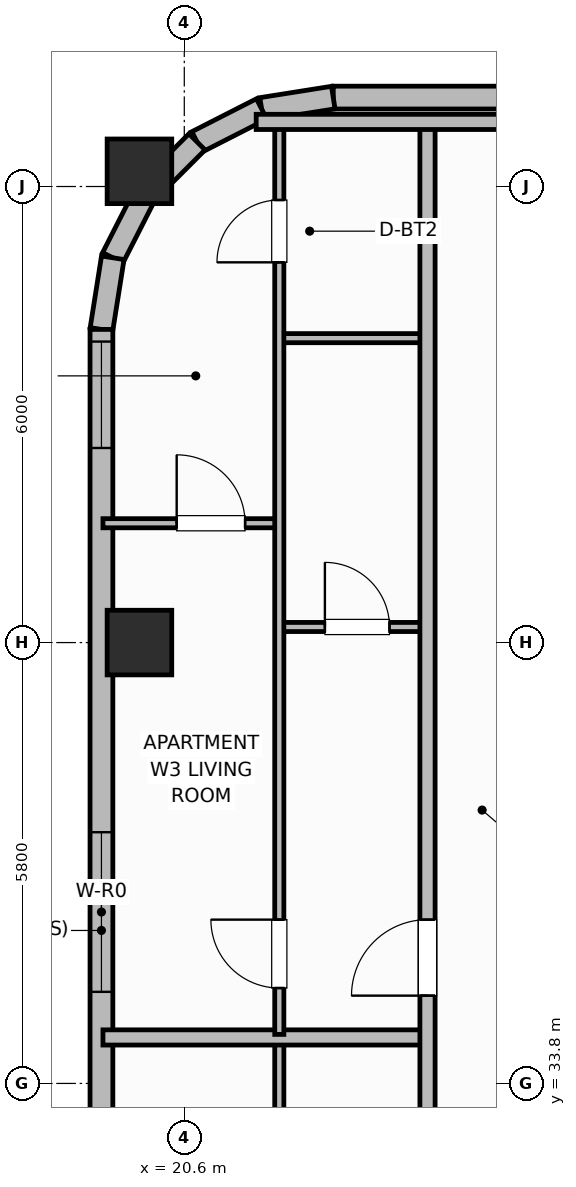
"""IFC4 building model, lengths in metres.
Left out: names, types, materials, properties, quantities, classifications, styles, units other than length and angle.
Written with IfcOpenShell. Run it as: python <this file> out.ifc"""

import sys

from ifc_helpers import new_model, si_unit, direction, frame, frame_2d, origin, origin_2d, place, context, subcontext, project, spatial, rectangle, extrude, element, fill, save


model = new_model("IFC4")
c1 = context("Model", 3, precision=1e-05, world=origin(), true_north=direction((0.0, 1.0)))
c2 = subcontext(c1, "Body", "Model", "MODEL_VIEW")
j1 = project(units=[si_unit("LENGTHUNIT", "METRE"), si_unit("PLANEANGLEUNIT", "RADIAN")], contexts=[c1])
p1 = place(None, origin())
s1 = spatial("IfcSite", under=j1, at=p1, CompositionType="ELEMENT")
p2 = place(p1, origin())
s2 = spatial("IfcBuilding", under=s1, at=p2, CompositionType="ELEMENT")
p3 = place(p2, frame((0.0, 0.0, 240.6)))
s3 = spatial("IfcBuildingStorey", under=s2, at=p3, CompositionType="ELEMENT", Elevation=240.6)
for number, where, z_axis, x_axis in (
    (1, (20.01, 39.6, 0.0), (0.0, 0.0, 1.0), (1.0, 0.0, 0.0)),
    (2, (20.01, 45.8, 0.0), (0.0, 0.0, 1.0), (1.0, 0.0, 0.0)),
):
    element("IfcColumn", number, at=place(p3, frame(where, z_axis=z_axis, x_axis=x_axis)), inside=s3, PredefinedType="COLUMN", context=c2, shape_type="SweptSolid", body=[
        extrude(rectangle(XDim=0.85, YDim=0.85, at=origin_2d()), origin(), (0.0, 0.0, 1.0), 3.7),
    ])
p4 = place(p3, frame((55.84, 46.77, 0.0), z_axis=(0.0, 0.0, 1.0), x_axis=(-1.0, 0.0, 0.0)))
e3 = element("IfcWall", 3, at=p4, inside=s3, PredefinedType="SOLIDWALL", context=c2, shape_type="SweptSolid", body=[
    extrude(rectangle(XDim=33.28, YDim=0.3, at=frame_2d((16.64, 0.0))), origin(), (0.0, 0.0, 1.0), 2.73),
])
p5 = place(p4, frame((4.461, 0.0, 0.95)))
e4 = element("IfcOpeningElement", 4, at=p5, cuts=e3, PredefinedType="OPENING", context=c2, shape_type="SweptSolid", body=[
    extrude(rectangle(XDim=1.1, YDim=1.65, at=frame_2d((0.55, 0.825))), frame((0.0, 0.16, 0.0), z_axis=(0.0, -1.0, 0.0), x_axis=(1.0, 0.0, 0.0)), (0.0, 0.0, 1.0), 0.32),
])
p6 = place(p4, frame((7.368, 0.0, 0.95)))
e5 = element("IfcOpeningElement", 5, at=p6, cuts=e3, PredefinedType="OPENING", context=c2, shape_type="SweptSolid", body=[
    extrude(rectangle(XDim=1.1, YDim=1.65, at=frame_2d((0.55, 0.825))), frame((0.0, 0.16, 0.0), z_axis=(0.0, -1.0, 0.0), x_axis=(1.0, 0.0, 0.0)), (0.0, 0.0, 1.0), 0.32),
])
p7 = place(p4, frame((10.275, 0.0, 0.95)))
e6 = element("IfcOpeningElement", 6, at=p7, cuts=e3, PredefinedType="OPENING", context=c2, shape_type="SweptSolid", body=[
    extrude(rectangle(XDim=1.1, YDim=1.65, at=frame_2d((0.55, 0.825))), frame((0.0, 0.16, 0.0), z_axis=(0.0, -1.0, 0.0), x_axis=(1.0, 0.0, 0.0)), (0.0, 0.0, 1.0), 0.32),
])
p8 = place(p4, frame((13.883, 0.0, 0.95)))
e7 = element("IfcOpeningElement", 7, at=p8, cuts=e3, PredefinedType="OPENING", context=c2, shape_type="SweptSolid", body=[
    extrude(rectangle(XDim=1.1, YDim=1.65, at=frame_2d((0.55, 0.825))), frame((0.0, 0.16, 0.0), z_axis=(0.0, -1.0, 0.0), x_axis=(1.0, 0.0, 0.0)), (0.0, 0.0, 1.0), 0.32),
])
p9 = place(p4, frame((16.09, 0.0, 0.95)))
e8 = element("IfcOpeningElement", 8, at=p9, cuts=e3, PredefinedType="OPENING", context=c2, shape_type="SweptSolid", body=[
    extrude(rectangle(XDim=1.1, YDim=1.65, at=frame_2d((0.55, 0.825))), frame((0.0, 0.16, 0.0), z_axis=(0.0, -1.0, 0.0), x_axis=(1.0, 0.0, 0.0)), (0.0, 0.0, 1.0), 0.32),
])
p10 = place(p4, frame((18.297, 0.0, 0.95)))
e9 = element("IfcOpeningElement", 9, at=p10, cuts=e3, PredefinedType="OPENING", context=c2, shape_type="SweptSolid", body=[
    extrude(rectangle(XDim=1.1, YDim=1.65, at=frame_2d((0.55, 0.825))), frame((0.0, 0.16, 0.0), z_axis=(0.0, -1.0, 0.0), x_axis=(1.0, 0.0, 0.0)), (0.0, 0.0, 1.0), 0.32),
])
p11 = place(p4, frame((21.905, 0.0, 0.95)))
e10 = element("IfcOpeningElement", 10, at=p11, cuts=e3, PredefinedType="OPENING", context=c2, shape_type="SweptSolid", body=[
    extrude(rectangle(XDim=1.1, YDim=1.65, at=frame_2d((0.55, 0.825))), frame((0.0, 0.16, 0.0), z_axis=(0.0, -1.0, 0.0), x_axis=(1.0, 0.0, 0.0)), (0.0, 0.0, 1.0), 0.32),
])
p12 = place(p4, frame((24.812, 0.0, 0.95)))
e11 = element("IfcOpeningElement", 11, at=p12, cuts=e3, PredefinedType="OPENING", context=c2, shape_type="SweptSolid", body=[
    extrude(rectangle(XDim=1.1, YDim=1.65, at=frame_2d((0.55, 0.825))), frame((0.0, 0.16, 0.0), z_axis=(0.0, -1.0, 0.0), x_axis=(1.0, 0.0, 0.0)), (0.0, 0.0, 1.0), 0.32),
])
p13 = place(p4, frame((27.719, 0.0, 0.95)))
e12 = element("IfcOpeningElement", 12, at=p13, cuts=e3, PredefinedType="OPENING", context=c2, shape_type="SweptSolid", body=[
    extrude(rectangle(XDim=1.1, YDim=1.65, at=frame_2d((0.55, 0.825))), frame((0.0, 0.16, 0.0), z_axis=(0.0, -1.0, 0.0), x_axis=(1.0, 0.0, 0.0)), (0.0, 0.0, 1.0), 0.32),
])
p14 = place(p3, frame((22.56, 46.77, 0.0), z_axis=(0.0, 0.0, 1.0), x_axis=(-0.987669453596, -0.156553666304, 0.0)))
e13 = element("IfcWall", 13, at=p14, inside=s3, PredefinedType="SOLIDWALL", context=c2, shape_type="SweptSolid", body=[
    extrude(rectangle(XDim=0.954, YDim=0.3, at=frame_2d((0.477, 0.0))), origin(), (0.0, 0.0, 1.0), 2.73),
])
p15 = place(p3, frame((21.617, 46.621, 0.0), z_axis=(0.0, 0.0, 1.0), x_axis=(-0.891023873617, -0.45395644796, 0.0)))
e14 = element("IfcWall", 14, at=p15, inside=s3, PredefinedType="SOLIDWALL", context=c2, shape_type="SweptSolid", body=[
    extrude(rectangle(XDim=0.954, YDim=0.3, at=frame_2d((0.477, 0.0))), origin(), (0.0, 0.0, 1.0), 2.73),
])
p16 = place(p3, frame((20.767, 46.188, 0.0), z_axis=(0.0, 0.0, 1.0), x_axis=(-0.707106781187, -0.707106781187, 0.0)))
e15 = element("IfcWall", 15, at=p16, inside=s3, PredefinedType="SOLIDWALL", context=c2, shape_type="SweptSolid", body=[
    extrude(rectangle(XDim=0.954, YDim=0.3, at=frame_2d((0.477, 0.0))), origin(), (0.0, 0.0, 1.0), 2.73),
])
p17 = place(p3, frame((20.093, 45.513, 0.0), z_axis=(0.0, 0.0, 1.0), x_axis=(-0.454159573051, -0.890920356825, 0.0)))
e16 = element("IfcWall", 16, at=p17, inside=s3, PredefinedType="SOLIDWALL", context=c2, shape_type="SweptSolid", body=[
    extrude(rectangle(XDim=0.954, YDim=0.3, at=frame_2d((0.477, 0.0))), origin(), (0.0, 0.0, 1.0), 2.73),
])
p18 = place(p3, frame((19.659, 44.663, 0.0), z_axis=(0.0, 0.0, 1.0), x_axis=(-0.156304114255, -0.987708977314, 0.0)))
e17 = element("IfcWall", 17, at=p18, inside=s3, PredefinedType="SOLIDWALL", context=c2, shape_type="SweptSolid", body=[
    extrude(rectangle(XDim=0.954, YDim=0.3, at=frame_2d((0.477, 0.0))), origin(), (0.0, 0.0, 1.0), 2.73),
])
p19 = place(p3, frame((19.51, 43.72, 0.0), z_axis=(0.0, 0.0, 1.0), x_axis=(0.0, -1.0, 0.0)))
e18 = element("IfcWall", 18, at=p19, inside=s3, PredefinedType="SOLIDWALL", context=c2, shape_type="SweptSolid", body=[
    extrude(rectangle(XDim=11.12, YDim=0.3, at=frame_2d((5.56, 0.0))), origin(), (0.0, 0.0, 1.0), 2.73),
])
p20 = place(p19, frame((0.16, 0.0, 0.72)))
e19 = element("IfcOpeningElement", 19, at=p20, cuts=e18, PredefinedType="OPENING", context=c2, shape_type="SweptSolid", body=[
    extrude(rectangle(XDim=1.4, YDim=1.85, at=frame_2d((0.7, 0.925))), frame((0.0, 0.16, 0.0), z_axis=(0.0, -1.0, 0.0), x_axis=(1.0, 0.0, 0.0)), (0.0, 0.0, 1.0), 0.32),
])
p21 = place(p19, frame((6.615, 0.0, 0.71)))
e20 = element("IfcOpeningElement", 20, at=p21, cuts=e18, PredefinedType="OPENING", context=c2, shape_type="SweptSolid", body=[
    extrude(rectangle(XDim=2.1, YDim=1.9, at=frame_2d((1.05, 0.95))), frame((0.0, 0.16, 0.0), z_axis=(0.0, -1.0, 0.0), x_axis=(1.0, 0.0, 0.0)), (0.0, 0.0, 1.0), 0.32),
])
p22 = place(p3, frame((21.85, 22.74, 0.0), z_axis=(0.0, 0.0, 1.0), x_axis=(0.0, 1.0, 0.0)))
e21 = element("IfcWall", 21, at=p22, inside=s3, PredefinedType="PARTITIONING", context=c2, shape_type="SweptSolid", body=[
    extrude(rectangle(XDim=11.625, YDim=0.12, at=frame_2d((5.812, 0.0))), origin(), (0.0, 0.0, 1.0), 2.56),
])
p23 = place(p22, frame((0.61, 0.0, 0.0)))
e22 = element("IfcOpeningElement", 22, at=p23, cuts=e21, PredefinedType="OPENING", context=c2, shape_type="SweptSolid", body=[
    extrude(rectangle(XDim=0.9, YDim=2.1, at=frame_2d((0.45, 1.05))), frame((0.0, 0.07, 0.0), z_axis=(0.0, -1.0, 0.0), x_axis=(1.0, 0.0, 0.0)), (0.0, 0.0, 1.0), 0.14),
])
p24 = place(p3, frame((19.53, 34.405, 0.0), z_axis=(0.0, 0.0, 1.0), x_axis=(1.0, 0.0, 0.0)))
e23 = element("IfcWall", 23, at=p24, inside=s3, PredefinedType="PARTITIONING", context=c2, shape_type="SweptSolid", body=[
    extrude(rectangle(XDim=4.27, YDim=0.2, at=frame_2d((2.135, 0.0))), origin(), (0.0, 0.0, 1.0), 2.56),
])
p25 = place(p3, frame((21.85, 39.805, 0.0), z_axis=(0.0, 0.0, 1.0), x_axis=(1.0, 0.0, 0.0)))
e24 = element("IfcWall", 24, at=p25, inside=s3, PredefinedType="PARTITIONING", context=c2, shape_type="SweptSolid", body=[
    extrude(rectangle(XDim=1.95, YDim=0.12, at=frame_2d((0.975, 0.0))), origin(), (0.0, 0.0, 1.0), 2.56),
])
p26 = place(p25, frame((0.6, 0.0, 0.0)))
e25 = element("IfcOpeningElement", 25, at=p26, cuts=e24, PredefinedType="OPENING", context=c2, shape_type="SweptSolid", body=[
    extrude(rectangle(XDim=0.85, YDim=2.1, at=frame_2d((0.425, 1.05))), frame((0.0, 0.07, 0.0), z_axis=(0.0, -1.0, 0.0), x_axis=(1.0, 0.0, 0.0)), (0.0, 0.0, 1.0), 0.14),
])
p27 = place(p3, frame((21.85, 43.605, 0.0), z_axis=(0.0, 0.0, 1.0), x_axis=(1.0, 0.0, 0.0)))
e26 = element("IfcWall", 26, at=p27, inside=s3, PredefinedType="PARTITIONING", context=c2, shape_type="SweptSolid", body=[
    extrude(rectangle(XDim=1.95, YDim=0.12, at=frame_2d((0.975, 0.0))), origin(), (0.0, 0.0, 1.0), 2.56),
])
p28 = place(p3, frame((19.53, 41.17, 0.0), z_axis=(0.0, 0.0, 1.0), x_axis=(1.0, 0.0, 0.0)))
e27 = element("IfcWall", 27, at=p28, inside=s3, PredefinedType="PARTITIONING", context=c2, shape_type="SweptSolid", body=[
    extrude(rectangle(XDim=2.32, YDim=0.12, at=frame_2d((1.16, 0.0))), origin(), (0.0, 0.0, 1.0), 2.56),
])
p29 = place(p28, frame((0.97, 0.0, 0.0)))
e28 = element("IfcOpeningElement", 28, at=p29, cuts=e27, PredefinedType="OPENING", context=c2, shape_type="SweptSolid", body=[
    extrude(rectangle(XDim=0.9, YDim=2.1, at=frame_2d((0.45, 1.05))), frame((0.0, 0.07, 0.0), z_axis=(0.0, -1.0, 0.0), x_axis=(1.0, 0.0, 0.0)), (0.0, 0.0, 1.0), 0.14),
])
p30 = place(p3, frame((21.85, 34.445, 0.0), z_axis=(0.0, 0.0, 1.0), x_axis=(0.0, 1.0, 0.0)))
e29 = element("IfcWall", 29, at=p30, inside=s3, PredefinedType="PARTITIONING", context=c2, shape_type="SweptSolid", body=[
    extrude(rectangle(XDim=11.965, YDim=0.12, at=frame_2d((5.982, 0.0))), origin(), (0.0, 0.0, 1.0), 2.56),
])
p31 = place(p30, frame((0.61, 0.0, 0.0)))
e30 = element("IfcOpeningElement", 30, at=p31, cuts=e29, PredefinedType="OPENING", context=c2, shape_type="SweptSolid", body=[
    extrude(rectangle(XDim=0.9, YDim=2.1, at=frame_2d((0.45, 1.05))), frame((0.0, 0.07, 0.0), z_axis=(0.0, -1.0, 0.0), x_axis=(1.0, 0.0, 0.0)), (0.0, 0.0, 1.0), 0.14),
])
p32 = place(p30, frame((10.157, 0.0, 0.0)))
e31 = element("IfcOpeningElement", 31, at=p32, cuts=e29, PredefinedType="OPENING", context=c2, shape_type="SweptSolid", body=[
    extrude(rectangle(XDim=0.82, YDim=2.08, at=frame_2d((0.41, 1.04))), frame((0.0, 0.07, 0.0), z_axis=(0.0, -1.0, 0.0), x_axis=(1.0, 0.0, 0.0)), (0.0, 0.0, 1.0), 0.14),
])
p33 = place(p3, frame((23.8, 9.95, 0.0), z_axis=(0.0, 0.0, 1.0), x_axis=(0.0, 1.0, 0.0)))
e32 = element("IfcWall", 32, at=p33, inside=s3, PredefinedType="PARTITIONING", context=c2, shape_type="SweptSolid", body=[
    extrude(rectangle(XDim=36.5, YDim=0.2, at=frame_2d((18.25, 0.0))), origin(), (0.0, 0.0, 1.0), 2.56),
])
p34 = place(p33, frame((3.25, 0.0, 0.0)))
e33 = element("IfcOpeningElement", 33, at=p34, cuts=e32, PredefinedType="OPENING", context=c2, shape_type="SweptSolid", body=[
    extrude(rectangle(XDim=1.0, YDim=2.15, at=frame_2d((0.5, 1.075))), frame((0.0, 0.11, 0.0), z_axis=(0.0, -1.0, 0.0), x_axis=(1.0, 0.0, 0.0)), (0.0, 0.0, 1.0), 0.22),
])
p35 = place(p33, frame((13.3, 0.0, 0.0)))
e34 = element("IfcOpeningElement", 34, at=p35, cuts=e32, PredefinedType="OPENING", context=c2, shape_type="SweptSolid", body=[
    extrude(rectangle(XDim=1.0, YDim=2.15, at=frame_2d((0.5, 1.075))), frame((0.0, 0.11, 0.0), z_axis=(0.0, -1.0, 0.0), x_axis=(1.0, 0.0, 0.0)), (0.0, 0.0, 1.0), 0.22),
])
p36 = place(p33, frame((25.005, 0.0, 0.0)))
e35 = element("IfcOpeningElement", 35, at=p36, cuts=e32, PredefinedType="OPENING", context=c2, shape_type="SweptSolid", body=[
    extrude(rectangle(XDim=1.0, YDim=2.15, at=frame_2d((0.5, 1.075))), frame((0.0, 0.11, 0.0), z_axis=(0.0, -1.0, 0.0), x_axis=(1.0, 0.0, 0.0)), (0.0, 0.0, 1.0), 0.22),
])
p37 = place(p3, frame((21.546, 46.45, 0.0), z_axis=(0.0, 0.0, 1.0), x_axis=(1.0, 0.0, 0.0)))
e36 = element("IfcWall", 36, at=p37, inside=s3, PredefinedType="PARTITIONING", context=c2, shape_type="SweptSolid", body=[
    extrude(rectangle(XDim=3.754, YDim=0.2, at=frame_2d((1.877, 0.0))), origin(), (0.0, 0.0, 1.0), 2.56),
])
p38 = place(p20, origin())
e37 = element("IfcWindow", 37, at=p38, inside=s3, PartitioningType="SINGLE_PANEL", PredefinedType="WINDOW", context=c2, shape_type="SweptSolid", body=[
    extrude(rectangle(XDim=1.4, YDim=1.85, at=frame_2d((0.7, 0.925))), frame((0.0, 0.03, 0.0), z_axis=(0.0, -1.0, 0.0), x_axis=(1.0, 0.0, 0.0)), (0.0, 0.0, 1.0), 0.06),
])
fill(e19, e37)
p39 = place(p21, origin())
e38 = element("IfcWindow", 38, at=p39, inside=s3, PartitioningType="SINGLE_PANEL", PredefinedType="WINDOW", context=c2, shape_type="SweptSolid", body=[
    extrude(rectangle(XDim=2.1, YDim=1.9, at=frame_2d((1.05, 0.95))), frame((0.0, 0.03, 0.0), z_axis=(0.0, -1.0, 0.0), x_axis=(1.0, 0.0, 0.0)), (0.0, 0.0, 1.0), 0.06),
])
fill(e20, e38)
p40 = place(p26, origin())
e39 = element("IfcDoor", 39, at=p40, inside=s3, OperationType="SINGLE_SWING_LEFT", PredefinedType="DOOR", context=c2, shape_type="SweptSolid", body=[
    extrude(rectangle(XDim=0.85, YDim=2.1, at=frame_2d((0.425, 1.05))), frame((0.0, 0.025, 0.0), z_axis=(0.0, -1.0, 0.0), x_axis=(1.0, 0.0, 0.0)), (0.0, 0.0, 1.0), 0.05),
])
fill(e25, e39)
p41 = place(p29, origin())
e40 = element("IfcDoor", 40, at=p41, inside=s3, OperationType="SINGLE_SWING_LEFT", PredefinedType="DOOR", context=c2, shape_type="SweptSolid", body=[
    extrude(rectangle(XDim=0.9, YDim=2.1, at=frame_2d((0.45, 1.05))), frame((0.0, 0.025, 0.0), z_axis=(0.0, -1.0, 0.0), x_axis=(1.0, 0.0, 0.0)), (0.0, 0.0, 1.0), 0.05),
])
fill(e28, e40)
p42 = place(p31, origin())
e41 = element("IfcDoor", 41, at=p42, inside=s3, OperationType="SINGLE_SWING_RIGHT", PredefinedType="DOOR", context=c2, shape_type="SweptSolid", body=[
    extrude(rectangle(XDim=0.9, YDim=2.1, at=frame_2d((0.45, 1.05))), frame((0.0, 0.025, 0.0), z_axis=(0.0, -1.0, 0.0), x_axis=(1.0, 0.0, 0.0)), (0.0, 0.0, 1.0), 0.05),
])
fill(e30, e41)
p43 = place(p32, origin())
e42 = element("IfcDoor", 42, at=p43, inside=s3, OperationType="SINGLE_SWING_LEFT", PredefinedType="DOOR", context=c2, shape_type="SweptSolid", body=[
    extrude(rectangle(XDim=0.82, YDim=2.08, at=frame_2d((0.41, 1.04))), frame((0.0, 0.025, 0.0), z_axis=(0.0, -1.0, 0.0), x_axis=(1.0, 0.0, 0.0)), (0.0, 0.0, 1.0), 0.05),
])
fill(e31, e42)
p44 = place(p36, origin())
e43 = element("IfcDoor", 43, at=p44, inside=s3, OperationType="SINGLE_SWING_LEFT", PredefinedType="DOOR", context=c2, shape_type="SweptSolid", body=[
    extrude(rectangle(XDim=1.0, YDim=2.15, at=frame_2d((0.5, 1.075))), frame((0.0, 0.025, 0.0), z_axis=(0.0, -1.0, 0.0), x_axis=(1.0, 0.0, 0.0)), (0.0, 0.0, 1.0), 0.05),
])
fill(e35, e43)
save(model, sys.argv[1])
